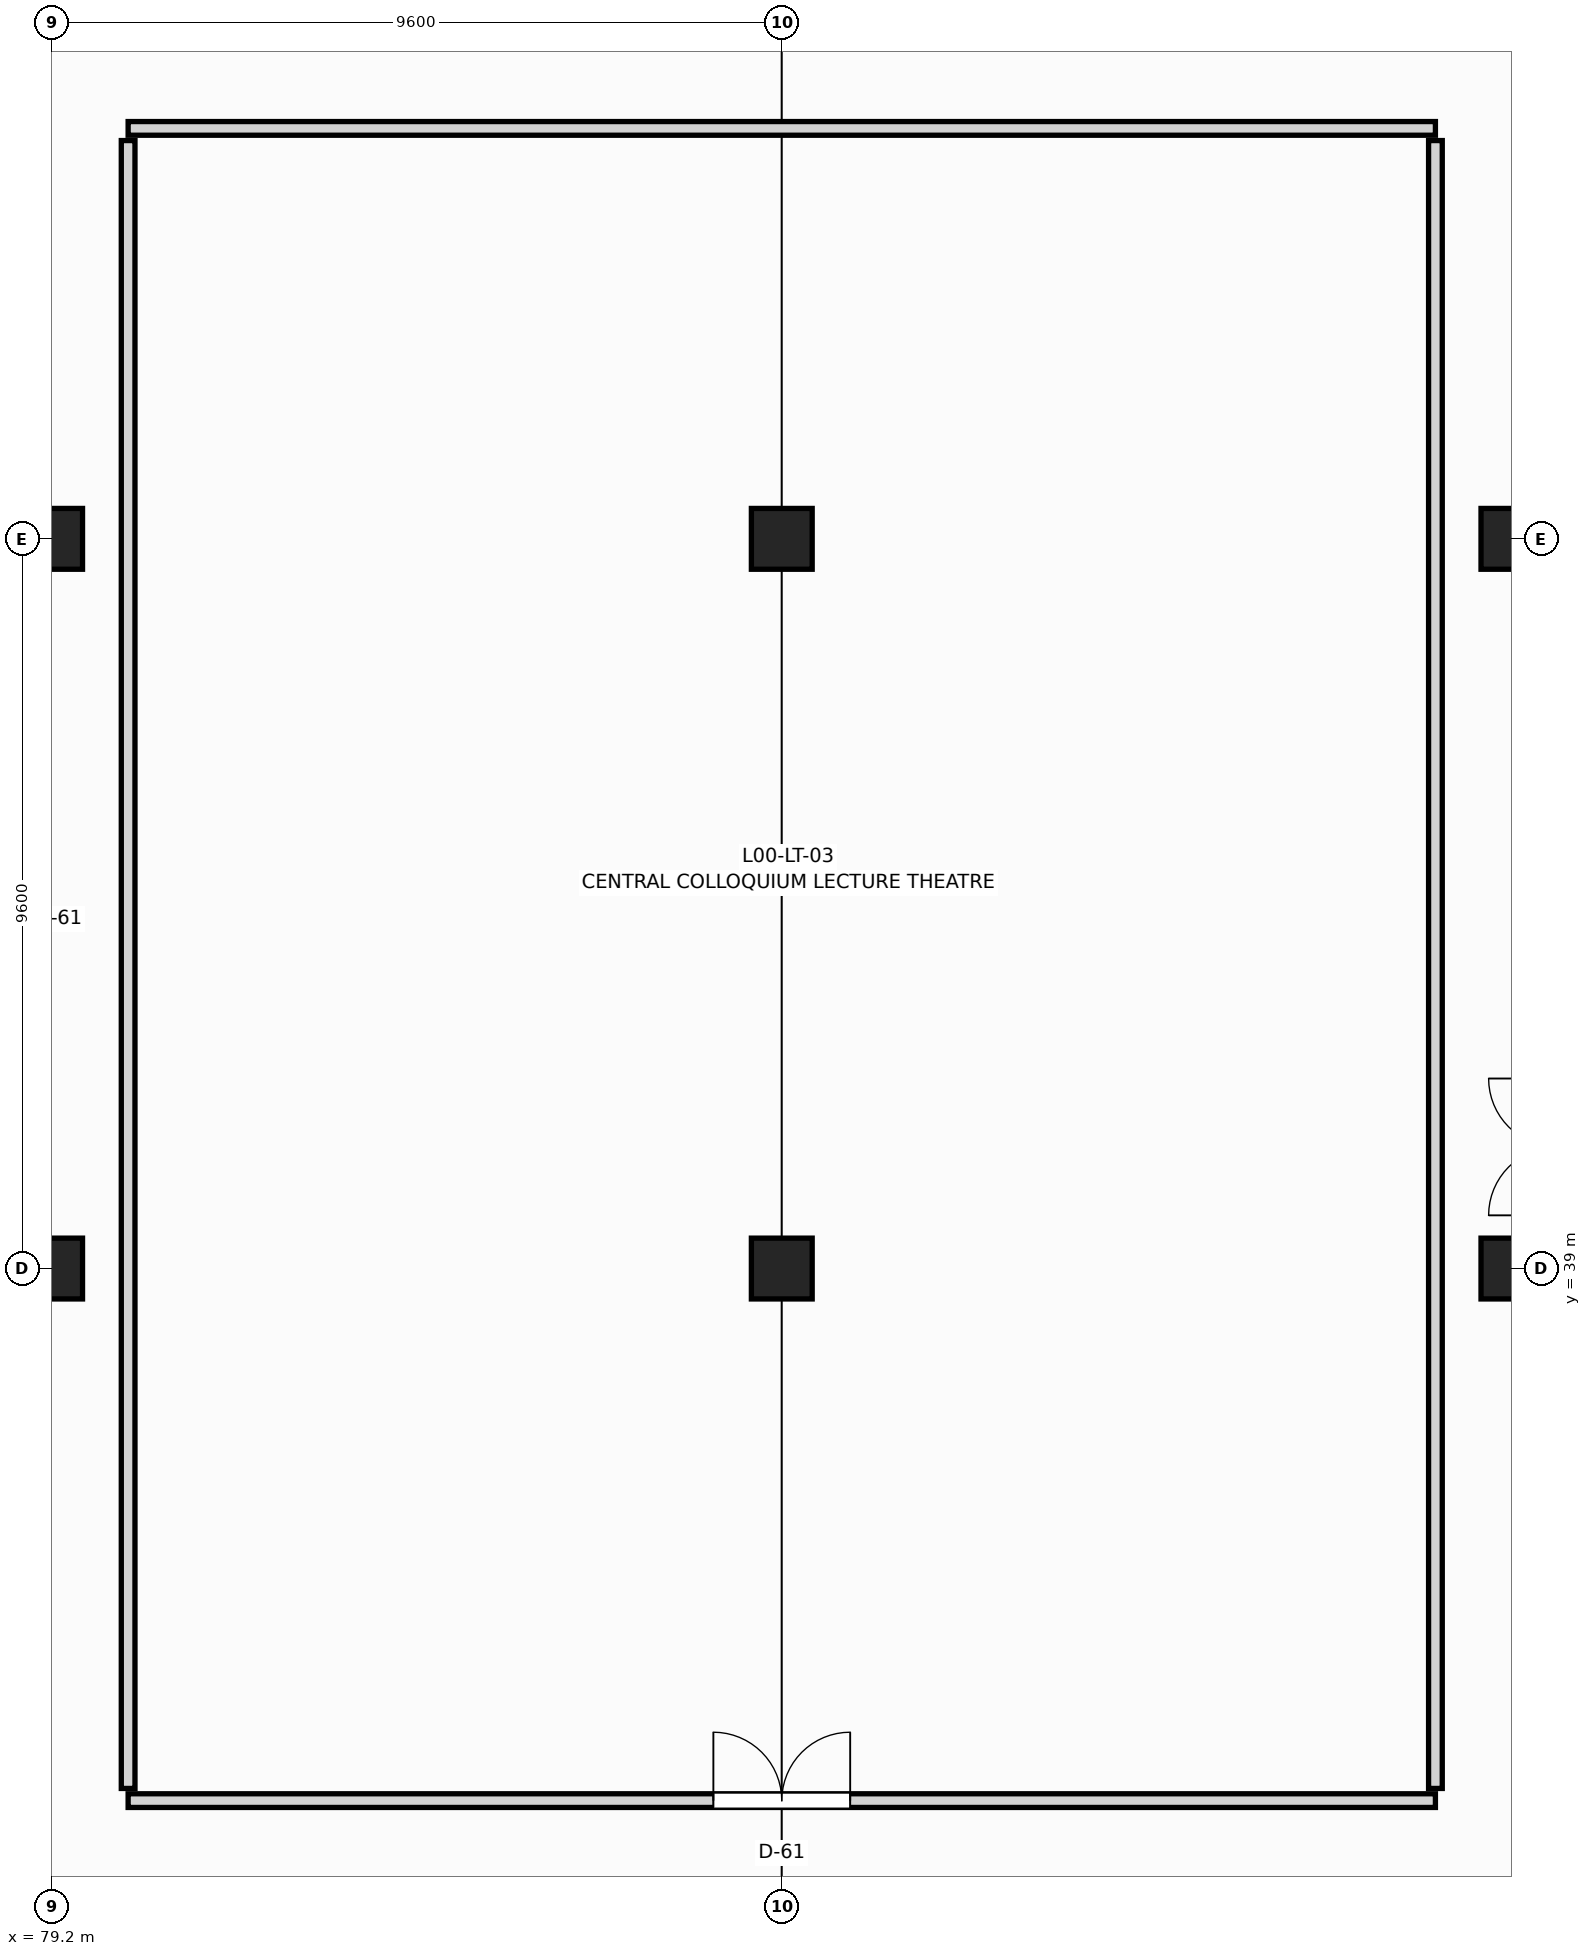
"""IFC4 building model, lengths in metres.
Left out: names, types, materials, properties, quantities, classifications, styles, units other than length and angle.
Written with IfcOpenShell. Run it as: python <this file> out.ifc"""

import sys

from ifc_helpers import new_model, si_unit, direction, frame, frame_2d, origin, origin_2d, place, context, subcontext, project, spatial, rectangle, extrude, element, fill, save


model = new_model("IFC4")
c1 = context("Model", 3, precision=1e-05, world=origin(), true_north=direction((0.0, 1.0)))
c2 = subcontext(c1, "Body", "Model", "MODEL_VIEW")
j1 = project(units=[si_unit("LENGTHUNIT", "METRE"), si_unit("PLANEANGLEUNIT", "RADIAN")], contexts=[c1])
p1 = place(None, origin())
s1 = spatial("IfcSite", under=j1, at=p1, CompositionType="ELEMENT")
p2 = place(p1, origin())
s2 = spatial("IfcBuilding", under=s1, at=p2, CompositionType="ELEMENT")
p3 = place(p2, origin())
s3 = spatial("IfcBuildingStorey", under=s2, at=p3, CompositionType="ELEMENT", Elevation=0.0)
for number, where, z_axis, x_axis in (
    (1, (79.2, 39.0, 0.0), (0.0, 0.0, 1.0), (1.0, 0.0, 0.0)),
    (2, (79.2, 48.6, 0.0), (0.0, 0.0, 1.0), (1.0, 0.0, 0.0)),
    (3, (88.8, 39.0, 0.0), (0.0, 0.0, 1.0), (1.0, 0.0, 0.0)),
    (4, (88.8, 48.6, 0.0), (0.0, 0.0, 1.0), (1.0, 0.0, 0.0)),
    (5, (98.4, 39.0, 0.0), (0.0, 0.0, 1.0), (1.0, 0.0, 0.0)),
    (6, (98.4, 48.6, 0.0), (0.0, 0.0, 1.0), (1.0, 0.0, 0.0)),
):
    element("IfcColumn", number, at=place(p3, frame(where, z_axis=z_axis, x_axis=x_axis)), inside=s3, PredefinedType="COLUMN", context=c2, shape_type="SweptSolid", body=[
        extrude(rectangle(XDim=0.8, YDim=0.8, at=origin_2d()), origin(), (0.0, 0.0, 1.0), 5.08),
    ])
p4 = place(p3, frame((80.2, 32.0, 0.0), z_axis=(0.0, 0.0, 1.0), x_axis=(1.0, 0.0, 0.0)))
e7 = element("IfcWall", 7, at=p4, inside=s3, PredefinedType="PARTITIONING", context=c2, shape_type="SweptSolid", body=[
    extrude(rectangle(XDim=17.2, YDim=0.18, at=frame_2d((8.6, 0.0))), origin(), (0.0, 0.0, 1.0), 4.12),
])
p5 = place(p4, frame((7.7, 0.0, 0.0)))
e8 = element("IfcOpeningElement", 8, at=p5, cuts=e7, PredefinedType="OPENING", context=c2, shape_type="SweptSolid", body=[
    extrude(rectangle(XDim=1.8, YDim=2.4, at=frame_2d((0.9, 1.2))), frame((0.0, 0.1, 0.0), z_axis=(0.0, -1.0, 0.0), x_axis=(1.0, 0.0, 0.0)), (0.0, 0.0, 1.0), 0.2),
])
p6 = place(p3, frame((80.2, 54.0, 0.0), z_axis=(0.0, 0.0, 1.0), x_axis=(1.0, 0.0, 0.0)))
e9 = element("IfcWall", 9, at=p6, inside=s3, PredefinedType="PARTITIONING", context=c2, shape_type="SweptSolid", body=[
    extrude(rectangle(XDim=17.2, YDim=0.18, at=frame_2d((8.6, 0.0))), origin(), (0.0, 0.0, 1.0), 4.12),
])
for number, where, z_axis, x_axis in (
    (10, (80.2, 32.16, 0.0), (0.0, 0.0, 1.0), (0.0, 1.0, 0.0)),
    (11, (97.4, 32.16, 0.0), (0.0, 0.0, 1.0), (0.0, 1.0, 0.0)),
):
    element("IfcWall", number, at=place(p3, frame(where, z_axis=z_axis, x_axis=x_axis)), inside=s3, PredefinedType="PARTITIONING", context=c2, shape_type="SweptSolid", body=[
        extrude(rectangle(XDim=21.68, YDim=0.18, at=frame_2d((10.84, 0.0))), origin(), (0.0, 0.0, 1.0), 4.12),
    ])
p7 = place(p5, origin())
e12 = element("IfcDoor", 12, at=p7, inside=s3, OperationType="DOUBLE_DOOR_SINGLE_SWING", PredefinedType="DOOR", context=c2, shape_type="SweptSolid", body=[
    extrude(rectangle(XDim=1.8, YDim=2.4, at=frame_2d((0.9, 1.2))), frame((0.0, 0.025, 0.0), z_axis=(0.0, -1.0, 0.0), x_axis=(1.0, 0.0, 0.0)), (0.0, 0.0, 1.0), 0.05),
])
fill(e8, e12)
save(model, sys.argv[1])
